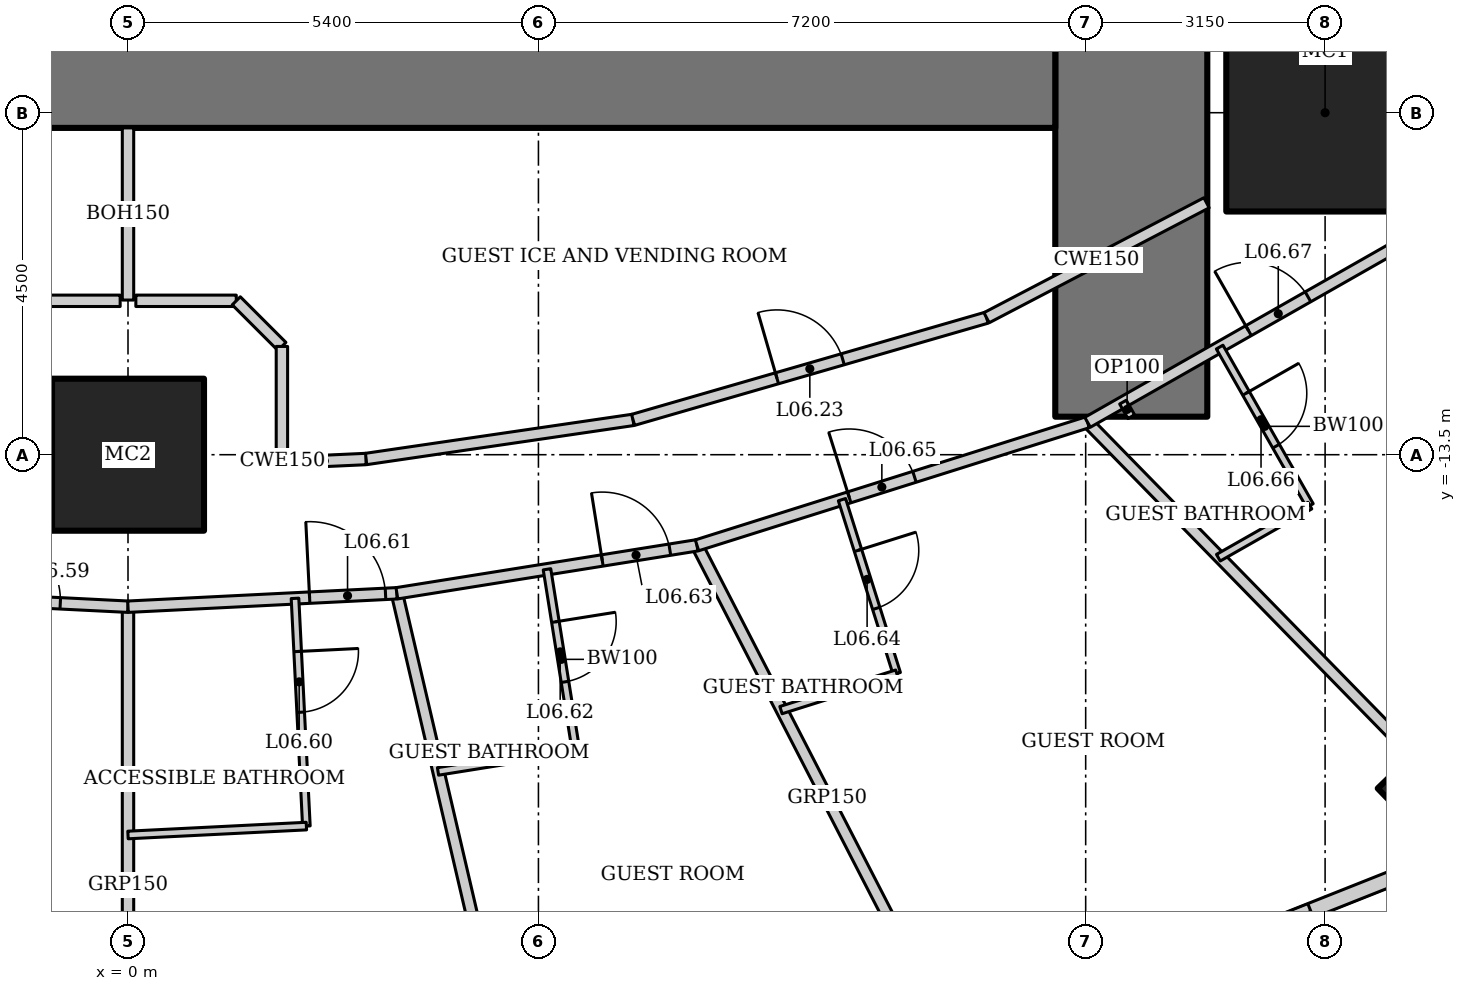
"""IFC4 building model, lengths in metres.
Left out: names, types, materials, properties, quantities, classifications, styles, units other than length and angle.
Written with IfcOpenShell. Run it as: python <this file> out.ifc"""

import sys

from ifc_helpers import new_model, si_unit, direction, frame, frame_2d, origin, origin_2d, place, context, subcontext, project, spatial, rectangle, hollow_rectangle, extrude, element, fill, save


model = new_model("IFC4")
c1 = context("Model", 3, precision=1e-05, world=origin(), true_north=direction((0.0, 1.0)))
c2 = subcontext(c1, "Body", "Model", "MODEL_VIEW")
j1 = project(units=[si_unit("LENGTHUNIT", "METRE"), si_unit("PLANEANGLEUNIT", "RADIAN")], contexts=[c1])
p1 = place(None, origin())
s1 = spatial("IfcSite", under=j1, at=p1, CompositionType="ELEMENT")
p2 = place(p1, origin())
s2 = spatial("IfcBuilding", under=s1, at=p2, CompositionType="ELEMENT")
p3 = place(p2, frame((0.0, 0.0, 37.0)))
s3 = spatial("IfcBuildingStorey", under=s2, at=p3, CompositionType="ELEMENT", Elevation=37.0)
p4 = place(p3, frame((0.0, -13.5, 0.0), z_axis=(0.0, 0.0, 1.0), x_axis=(1.0, 0.0, 0.0)))
e1 = element("IfcColumn", 1, at=p4, inside=s3, PredefinedType="COLUMN", context=c2, shape_type="SweptSolid", body=[
    extrude(hollow_rectangle(XDim=2.0, YDim=2.0, WallThickness=0.17, at=origin_2d()), origin(), (0.0, 0.0, 1.0), 3.6),
])
p5 = place(p3, frame((15.75, -9.0, 0.0), z_axis=(0.0, 0.0, 1.0), x_axis=(1.0, 0.0, 0.0)))
e2 = element("IfcColumn", 2, at=p5, inside=s3, PredefinedType="COLUMN", context=c2, shape_type="SweptSolid", body=[
    extrude(hollow_rectangle(XDim=2.6, YDim=2.6, WallThickness=0.13, at=origin_2d()), origin(), (0.0, 0.0, 1.0), 3.6),
])
p6 = place(p3, frame((17.291, -17.905, 0.0), z_axis=(0.0, 0.0, 1.0), x_axis=(0.719339800339, 0.694658370459, 0.0)))
e3 = element("IfcColumn", 3, at=p6, inside=s3, PredefinedType="COLUMN", context=c2, shape_type="SweptSolid", body=[
    extrude(hollow_rectangle(XDim=1.2, YDim=1.2, WallThickness=0.1, at=origin_2d()), origin(), (0.0, 0.0, 1.0), 3.6),
])
p7 = place(p3, frame((13.2, -13.0, 0.0), z_axis=(0.0, 0.0, 1.0), x_axis=(0.0, 1.0, 0.0)))
e4 = element("IfcWall", 4, at=p7, inside=s3, PredefinedType="SHEAR", context=c2, shape_type="SweptSolid", body=[
    extrude(rectangle(XDim=26.0, YDim=2.0, at=frame_2d((13.0, 0.0))), origin(), (0.0, 0.0, 1.0), 3.6),
])
p8 = place(p7, frame((12.1, 0.0, 0.0)))
e5 = element("IfcOpeningElement", 5, at=p8, cuts=e4, PredefinedType="OPENING", context=c2, shape_type="SweptSolid", body=[
    extrude(rectangle(XDim=1.8, YDim=2.1, at=frame_2d((0.9, 1.05))), frame((0.0, 1.01, 0.0), z_axis=(0.0, -1.0, 0.0), x_axis=(1.0, 0.0, 0.0)), (0.0, 0.0, 1.0), 2.02),
])
p9 = place(p3, frame((-12.2, -8.0, 0.0), z_axis=(0.0, 0.0, 1.0), x_axis=(1.0, 0.0, 0.0)))
e6 = element("IfcWall", 6, at=p9, inside=s3, PredefinedType="SHEAR", context=c2, shape_type="SweptSolid", body=[
    extrude(rectangle(XDim=24.4, YDim=2.4, at=frame_2d((12.2, 0.0))), origin(), (0.0, 0.0, 1.0), 3.6),
])
p10 = place(p3, frame((10.869, -21.363, 0.0), z_axis=(0.0, 0.0, 1.0), x_axis=(0.929358351251, 0.369178892895, 0.0)))
e7 = element("IfcWall", 7, at=p10, inside=s3, PredefinedType="SOLIDWALL", context=c2, shape_type="SweptSolid", body=[
    extrude(rectangle(XDim=7.692, YDim=0.2, at=frame_2d((3.846, 0.0))), origin(), (0.0, 0.0, 1.0), 3.45),
])
p11 = place(p10, frame((2.646, 0.0, 0.5)))
e8 = element("IfcOpeningElement", 8, at=p11, cuts=e7, PredefinedType="OPENING", context=c2, shape_type="SweptSolid", body=[
    extrude(rectangle(XDim=2.4, YDim=2.2, at=frame_2d((1.2, 1.1))), frame((0.0, 0.11, 0.0), z_axis=(0.0, -1.0, 0.0), x_axis=(1.0, 0.0, 0.0)), (0.0, 0.0, 1.0), 0.22),
])
p12 = place(p3, frame((0.0, -22.825, 0.0), z_axis=(0.0, 0.0, 1.0), x_axis=(0.0, 1.0, 0.0)))
e9 = element("IfcWall", 9, at=p12, inside=s3, PredefinedType="PARTITIONING", context=c2, shape_type="SweptSolid", body=[
    extrude(rectangle(XDim=7.325, YDim=0.15, at=frame_2d((3.662, 0.0))), origin(), (0.0, 0.0, 1.0), 2.924),
])
p13 = place(p3, frame((5.211, -22.496, 0.0), z_axis=(0.0, 0.0, 1.0), x_axis=(-0.227195035564, 0.973849277771, 0.0)))
e10 = element("IfcWall", 10, at=p13, inside=s3, PredefinedType="PARTITIONING", context=c2, shape_type="SweptSolid", body=[
    extrude(rectangle(XDim=7.365, YDim=0.15, at=frame_2d((3.683, 0.0))), origin(), (0.0, 0.0, 1.0), 2.767),
])
p14 = place(p3, frame((10.912, -21.346, 0.0), z_axis=(0.0, 0.0, 1.0), x_axis=(-0.45777845119, 0.889066302154, 0.0)))
e11 = element("IfcWall", 11, at=p14, inside=s3, PredefinedType="PARTITIONING", context=c2, shape_type="SweptSolid", body=[
    extrude(rectangle(XDim=7.483, YDim=0.15, at=frame_2d((3.742, 0.0))), origin(), (0.0, 0.0, 1.0), 2.528),
])
p15 = place(p3, frame((17.97, -18.542, 0.0), z_axis=(0.0, 0.0, 1.0), x_axis=(-0.699032031211, 0.715090357467, 0.0)))
e12 = element("IfcWall", 12, at=p15, inside=s3, PredefinedType="PARTITIONING", context=c2, shape_type="SweptSolid", body=[
    extrude(rectangle(XDim=7.647, YDim=0.15, at=frame_2d((3.824, 0.0))), origin(), (0.0, 0.0, 1.0), 2.528),
])
p16 = place(p3, frame((-3.538, -15.323, 0.0), z_axis=(0.0, 0.0, 1.0), x_axis=(0.998754057167, -0.049903239295, 0.0)))
e13 = element("IfcWall", 13, at=p16, inside=s3, PredefinedType="PARTITIONING", context=c2, shape_type="SweptSolid", body=[
    extrude(rectangle(XDim=3.542, YDim=0.15, at=frame_2d((1.771, 0.0))), origin(), (0.0, 0.0, 1.0), 3.45),
])
p17 = place(p16, frame((1.75, 0.0, 0.0)))
e14 = element("IfcOpeningElement", 14, at=p17, cuts=e13, PredefinedType="OPENING", context=c2, shape_type="SweptSolid", body=[
    extrude(rectangle(XDim=0.9, YDim=2.1, at=frame_2d((0.45, 1.05))), frame((0.0, 0.085, 0.0), z_axis=(0.0, -1.0, 0.0), x_axis=(1.0, 0.0, 0.0)), (0.0, 0.0, 1.0), 0.17),
])
p18 = place(p3, frame((0.0, -15.5, 0.0), z_axis=(0.0, 0.0, 1.0), x_axis=(0.998754057167, 0.049903239295, 0.0)))
e15 = element("IfcWall", 15, at=p18, inside=s3, PredefinedType="PARTITIONING", context=c2, shape_type="SweptSolid", body=[
    extrude(rectangle(XDim=3.542, YDim=0.15, at=frame_2d((1.771, 0.0))), origin(), (0.0, 0.0, 1.0), 3.45),
])
p19 = place(p18, frame((2.392, 0.0, 0.0)))
e16 = element("IfcOpeningElement", 16, at=p19, cuts=e15, PredefinedType="OPENING", context=c2, shape_type="SweptSolid", body=[
    extrude(rectangle(XDim=1.0, YDim=2.1, at=frame_2d((0.5, 1.05))), frame((0.0, 0.085, 0.0), z_axis=(0.0, -1.0, 0.0), x_axis=(1.0, 0.0, 0.0)), (0.0, 0.0, 1.0), 0.17),
])
p20 = place(p3, frame((3.538, -15.323, 0.0), z_axis=(0.0, 0.0, 1.0), x_axis=(0.987475660646, 0.157771415761, 0.0)))
e17 = element("IfcWall", 17, at=p20, inside=s3, PredefinedType="PARTITIONING", context=c2, shape_type="SweptSolid", body=[
    extrude(rectangle(XDim=3.999, YDim=0.15, at=frame_2d((1.999, 0.0))), origin(), (0.0, 0.0, 1.0), 3.45),
])
p21 = place(p20, frame((2.736, 0.0, 0.0)))
e18 = element("IfcOpeningElement", 18, at=p21, cuts=e17, PredefinedType="OPENING", context=c2, shape_type="SweptSolid", body=[
    extrude(rectangle(XDim=0.9, YDim=2.1, at=frame_2d((0.45, 1.05))), frame((0.0, 0.085, 0.0), z_axis=(0.0, -1.0, 0.0), x_axis=(1.0, 0.0, 0.0)), (0.0, 0.0, 1.0), 0.17),
])
p22 = place(p3, frame((7.486, -14.692, 0.0), z_axis=(0.0, 0.0, 1.0), x_axis=(0.953774229808, 0.30052407317, 0.0)))
e19 = element("IfcWall", 19, at=p22, inside=s3, PredefinedType="PARTITIONING", context=c2, shape_type="SweptSolid", body=[
    extrude(rectangle(XDim=5.388, YDim=0.15, at=frame_2d((2.694, 0.0))), origin(), (0.0, 0.0, 1.0), 3.45),
])
p23 = place(p22, frame((2.1, 0.0, 0.0)))
e20 = element("IfcOpeningElement", 20, at=p23, cuts=e19, PredefinedType="OPENING", context=c2, shape_type="SweptSolid", body=[
    extrude(rectangle(XDim=0.9, YDim=2.1, at=frame_2d((0.45, 1.05))), frame((0.0, 0.085, 0.0), z_axis=(0.0, -1.0, 0.0), x_axis=(1.0, 0.0, 0.0)), (0.0, 0.0, 1.0), 0.17),
])
p24 = place(p3, frame((12.625, -13.073, 0.0), z_axis=(0.0, 0.0, 1.0), x_axis=(0.86907565943, 0.494679187136, 0.0)))
e21 = element("IfcWall", 21, at=p24, inside=s3, PredefinedType="PARTITIONING", context=c2, shape_type="SweptSolid", body=[
    extrude(rectangle(XDim=5.911, YDim=0.15, at=frame_2d((2.955, 0.0))), origin(), (0.0, 0.0, 1.0), 3.45),
])
p25 = place(p24, frame((2.437, 0.0, 0.0)))
e22 = element("IfcOpeningElement", 22, at=p25, cuts=e21, PredefinedType="OPENING", context=c2, shape_type="SweptSolid", body=[
    extrude(rectangle(XDim=0.9, YDim=2.1, at=frame_2d((0.45, 1.05))), frame((0.0, 0.085, 0.0), z_axis=(0.0, -1.0, 0.0), x_axis=(1.0, 0.0, 0.0)), (0.0, 0.0, 1.0), 0.17),
])
p26 = place(p3, frame((3.13, -13.557, 0.0), z_axis=(0.0, 0.0, 1.0), x_axis=(0.989443047021, 0.14492224364, 0.0)))
e23 = element("IfcWall", 23, at=p26, inside=s3, PredefinedType="PARTITIONING", context=c2, shape_type="SweptSolid", body=[
    extrude(rectangle(XDim=3.553, YDim=0.15, at=frame_2d((1.776, 0.0))), origin(), (0.0, 0.0, 1.0), 3.45),
])
p27 = place(p3, frame((6.645, -13.042, 0.0), z_axis=(0.0, 0.0, 1.0), x_axis=(0.960678318068, 0.277663770041, 0.0)))
e24 = element("IfcWall", 24, at=p27, inside=s3, PredefinedType="PARTITIONING", context=c2, shape_type="SweptSolid", body=[
    extrude(rectangle(XDim=4.841, YDim=0.15, at=frame_2d((2.421, 0.0))), origin(), (0.0, 0.0, 1.0), 3.45),
])
p28 = place(p27, frame((1.971, 0.0, 0.0)))
e25 = element("IfcOpeningElement", 25, at=p28, cuts=e24, PredefinedType="OPENING", context=c2, shape_type="SweptSolid", body=[
    extrude(rectangle(XDim=0.9, YDim=2.1, at=frame_2d((0.45, 1.05))), frame((0.0, 0.085, 0.0), z_axis=(0.0, -1.0, 0.0), x_axis=(1.0, 0.0, 0.0)), (0.0, 0.0, 1.0), 0.17),
])
p29 = place(p3, frame((2.197, -15.39, 0.0), z_axis=(0.0, 0.0, 1.0), x_axis=(0.049888907753, -0.998754773147, 0.0)))
e26 = element("IfcWall", 26, at=p29, inside=s3, PredefinedType="PARTITIONING", context=c2, shape_type="SweptSolid", body=[
    extrude(rectangle(XDim=3.0, YDim=0.1, at=frame_2d((1.5, 0.0))), origin(), (0.0, 0.0, 1.0), 3.45),
])
p30 = place(p29, frame((0.7, 0.0, 0.0)))
e27 = element("IfcOpeningElement", 27, at=p30, cuts=e26, PredefinedType="OPENING", context=c2, shape_type="SweptSolid", body=[
    extrude(rectangle(XDim=0.8, YDim=2.1, at=frame_2d((0.4, 1.05))), frame((0.0, 0.06, 0.0), z_axis=(0.0, -1.0, 0.0), x_axis=(1.0, 0.0, 0.0)), (0.0, 0.0, 1.0), 0.12),
])
p31 = place(p3, frame((2.347, -18.386, 0.0), z_axis=(0.0, 0.0, 1.0), x_axis=(-0.998755704817, -0.049870252607, 0.0)))
e28 = element("IfcWall", 28, at=p31, inside=s3, PredefinedType="PARTITIONING", context=c2, shape_type="SweptSolid", body=[
    extrude(rectangle(XDim=2.35, YDim=0.1, at=frame_2d((1.175, 0.0))), origin(), (0.0, 0.0, 1.0), 3.45),
])
p32 = place(p3, frame((5.513, -15.008, 0.0), z_axis=(0.0, 0.0, 1.0), x_axis=(0.157780217218, -0.987474254376, 0.0)))
e29 = element("IfcWall", 29, at=p32, inside=s3, PredefinedType="PARTITIONING", context=c2, shape_type="SweptSolid", body=[
    extrude(rectangle(XDim=2.4, YDim=0.1, at=frame_2d((1.2, 0.0))), origin(), (0.0, 0.0, 1.0), 3.45),
])
p33 = place(p32, frame((0.7, 0.0, 0.0)))
e30 = element("IfcOpeningElement", 30, at=p33, cuts=e29, PredefinedType="OPENING", context=c2, shape_type="SweptSolid", body=[
    extrude(rectangle(XDim=0.8, YDim=2.1, at=frame_2d((0.4, 1.05))), frame((0.0, 0.06, 0.0), z_axis=(0.0, -1.0, 0.0), x_axis=(1.0, 0.0, 0.0)), (0.0, 0.0, 1.0), 0.12),
])
p34 = place(p3, frame((5.891, -17.378, 0.0), z_axis=(0.0, 0.0, 1.0), x_axis=(-0.987478784284, -0.157751863976, 0.0)))
e31 = element("IfcWall", 31, at=p34, inside=s3, PredefinedType="PARTITIONING", context=c2, shape_type="SweptSolid", body=[
    extrude(rectangle(XDim=1.835, YDim=0.1, at=frame_2d((0.918, 0.0))), origin(), (0.0, 0.0, 1.0), 3.45),
])
p35 = place(p3, frame((9.394, -14.091, 0.0), z_axis=(0.0, 0.0, 1.0), x_axis=(0.30049839721, -0.953782319649, 0.0)))
e32 = element("IfcWall", 32, at=p35, inside=s3, PredefinedType="PARTITIONING", context=c2, shape_type="SweptSolid", body=[
    extrude(rectangle(XDim=2.4, YDim=0.1, at=frame_2d((1.2, 0.0))), origin(), (0.0, 0.0, 1.0), 3.45),
])
p36 = place(p35, frame((0.7, 0.0, 0.0)))
e33 = element("IfcOpeningElement", 33, at=p36, cuts=e32, PredefinedType="OPENING", context=c2, shape_type="SweptSolid", body=[
    extrude(rectangle(XDim=0.8, YDim=2.1, at=frame_2d((0.4, 1.05))), frame((0.0, 0.06, 0.0), z_axis=(0.0, -1.0, 0.0), x_axis=(1.0, 0.0, 0.0)), (0.0, 0.0, 1.0), 0.12),
])
p37 = place(p3, frame((10.115, -16.38, 0.0), z_axis=(0.0, 0.0, 1.0), x_axis=(-0.953764923986, -0.300553605492, 0.0)))
e34 = element("IfcWall", 34, at=p37, inside=s3, PredefinedType="PARTITIONING", context=c2, shape_type="SweptSolid", body=[
    extrude(rectangle(XDim=1.598, YDim=0.1, at=frame_2d((0.799, 0.0))), origin(), (0.0, 0.0, 1.0), 3.45),
])
p38 = place(p3, frame((14.363, -12.084, 0.0), z_axis=(0.0, 0.0, 1.0), x_axis=(0.494703113698, -0.869062039959, 0.0)))
e35 = element("IfcWall", 35, at=p38, inside=s3, PredefinedType="PARTITIONING", context=c2, shape_type="SweptSolid", body=[
    extrude(rectangle(XDim=2.4, YDim=0.1, at=frame_2d((1.2, 0.0))), origin(), (0.0, 0.0, 1.0), 3.45),
])
p39 = place(p38, frame((0.7, 0.0, 0.0)))
e36 = element("IfcOpeningElement", 36, at=p39, cuts=e35, PredefinedType="OPENING", context=c2, shape_type="SweptSolid", body=[
    extrude(rectangle(XDim=0.8, YDim=2.1, at=frame_2d((0.4, 1.05))), frame((0.0, 0.06, 0.0), z_axis=(0.0, -1.0, 0.0), x_axis=(1.0, 0.0, 0.0)), (0.0, 0.0, 1.0), 0.12),
])
p40 = place(p3, frame((15.55, -14.17, 0.0), z_axis=(0.0, 0.0, 1.0), x_axis=(-0.869065896633, -0.494696338485, 0.0)))
e37 = element("IfcWall", 37, at=p40, inside=s3, PredefinedType="PARTITIONING", context=c2, shape_type="SweptSolid", body=[
    extrude(rectangle(XDim=1.386, YDim=0.1, at=frame_2d((0.693, 0.0))), origin(), (0.0, 0.0, 1.0), 3.45),
])
p41 = place(p3, frame((13.2, -13.0, 0.0), z_axis=(0.0, 0.0, 1.0), x_axis=(-0.49435138335, 0.869262164011, 0.0)))
e38 = element("IfcWall", 38, at=p41, inside=s3, PredefinedType="PARTITIONING", context=c2, shape_type="SweptSolid", body=[
    extrude(rectangle(XDim=0.221, YDim=0.1, at=frame_2d((0.11, 0.0))), origin(), (0.0, 0.0, 1.0), 3.45),
])
p42 = place(p3, frame((2.035, -13.607, 0.0), z_axis=(0.0, 0.0, 1.0), x_axis=(0.998946843147, 0.045882508292, 0.0)))
e39 = element("IfcWall", 39, at=p42, inside=s3, PredefinedType="PARTITIONING", context=c2, shape_type="SweptSolid", body=[
    extrude(rectangle(XDim=1.096, YDim=0.15, at=frame_2d((0.548, 0.0))), origin(), (0.0, 0.0, 1.0), 3.45),
])
p43 = place(p3, frame((0.0, -9.2, 0.0), z_axis=(0.0, 0.0, 1.0), x_axis=(0.0, -1.0, 0.0)))
e40 = element("IfcWall", 40, at=p43, inside=s3, PredefinedType="PARTITIONING", context=c2, shape_type="SweptSolid", body=[
    extrude(rectangle(XDim=2.265, YDim=0.15, at=frame_2d((1.133, 0.0))), origin(), (0.0, 0.0, 1.0), 3.044),
])
for number, where, z_axis, x_axis in (
    (41, (-1.425, -11.475, 0.0), (0.0, 0.0, 1.0), (1.0, 0.0, 0.0)),
    (42, (0.103, -11.475, 0.0), (0.0, 0.0, 1.0), (1.0, 0.0, 0.0)),
):
    element("IfcWall", number, at=place(p3, frame(where, z_axis=z_axis, x_axis=x_axis)), inside=s3, PredefinedType="PARTITIONING", context=c2, shape_type="SweptSolid", body=[
        extrude(rectangle(XDim=1.321, YDim=0.15, at=frame_2d((0.661, 0.0))), origin(), (0.0, 0.0, 1.0), 3.45),
    ])
p44 = place(p3, frame((1.425, -11.475, 0.0), z_axis=(0.0, 0.0, 1.0), x_axis=(0.707106781187, -0.707106781187, 0.0)))
e43 = element("IfcWall", 43, at=p44, inside=s3, PredefinedType="PARTITIONING", context=c2, shape_type="SweptSolid", body=[
    extrude(rectangle(XDim=0.849, YDim=0.15, at=frame_2d((0.425, 0.0))), origin(), (0.0, 0.0, 1.0), 3.45),
])
p45 = place(p3, frame((2.025, -12.075, 0.0), z_axis=(0.0, 0.0, 1.0), x_axis=(0.0, -1.0, 0.0)))
e44 = element("IfcWall", 44, at=p45, inside=s3, PredefinedType="PARTITIONING", context=c2, shape_type="SweptSolid", body=[
    extrude(rectangle(XDim=1.427, YDim=0.15, at=frame_2d((0.714, 0.0))), origin(), (0.0, 0.0, 1.0), 2.749),
])
p46 = place(p3, frame((11.296, -11.698, 0.0), z_axis=(0.0, 0.0, 1.0), x_axis=(0.886283344337, 0.463143426544, 0.0)))
e45 = element("IfcWall", 45, at=p46, inside=s3, PredefinedType="PARTITIONING", context=c2, shape_type="SweptSolid", body=[
    extrude(rectangle(XDim=3.265, YDim=0.15, at=frame_2d((1.633, 0.0))), origin(), (0.0, 0.0, 1.0), 3.45),
])
p47 = place(p11, origin())
e46 = element("IfcWindow", 46, at=p47, inside=s3, PartitioningType="SINGLE_PANEL", PredefinedType="WINDOW", context=c2, shape_type="SweptSolid", body=[
    extrude(rectangle(XDim=2.4, YDim=2.2, at=frame_2d((1.2, 1.1))), frame((0.0, 0.03, 0.0), z_axis=(0.0, -1.0, 0.0), x_axis=(1.0, 0.0, 0.0)), (0.0, 0.0, 1.0), 0.06),
])
fill(e8, e46)
p48 = place(p28, origin())
e47 = element("IfcDoor", 47, at=p48, inside=s3, OperationType="SINGLE_SWING_LEFT", PredefinedType="DOOR", context=c2, shape_type="SweptSolid", body=[
    extrude(rectangle(XDim=0.9, YDim=2.1, at=frame_2d((0.45, 1.05))), frame((0.0, 0.025, 0.0), z_axis=(0.0, -1.0, 0.0), x_axis=(1.0, 0.0, 0.0)), (0.0, 0.0, 1.0), 0.05),
])
fill(e25, e47)
p49 = place(p17, origin())
e48 = element("IfcDoor", 48, at=p49, inside=s3, OperationType="SINGLE_SWING_LEFT", PredefinedType="DOOR", context=c2, shape_type="SweptSolid", body=[
    extrude(rectangle(XDim=0.9, YDim=2.1, at=frame_2d((0.45, 1.05))), frame((0.0, 0.025, 0.0), z_axis=(0.0, -1.0, 0.0), x_axis=(1.0, 0.0, 0.0)), (0.0, 0.0, 1.0), 0.05),
])
fill(e14, e48)
p50 = place(p30, origin())
e49 = element("IfcDoor", 49, at=p50, inside=s3, OperationType="SINGLE_SWING_LEFT", PredefinedType="DOOR", context=c2, shape_type="SweptSolid", body=[
    extrude(rectangle(XDim=0.8, YDim=2.1, at=frame_2d((0.4, 1.05))), frame((0.0, 0.025, 0.0), z_axis=(0.0, -1.0, 0.0), x_axis=(1.0, 0.0, 0.0)), (0.0, 0.0, 1.0), 0.05),
])
fill(e27, e49)
p51 = place(p19, origin())
e50 = element("IfcDoor", 50, at=p51, inside=s3, OperationType="SINGLE_SWING_LEFT", PredefinedType="DOOR", context=c2, shape_type="SweptSolid", body=[
    extrude(rectangle(XDim=1.0, YDim=2.1, at=frame_2d((0.5, 1.05))), frame((0.0, 0.025, 0.0), z_axis=(0.0, -1.0, 0.0), x_axis=(1.0, 0.0, 0.0)), (0.0, 0.0, 1.0), 0.05),
])
fill(e16, e50)
p52 = place(p33, origin())
e51 = element("IfcDoor", 51, at=p52, inside=s3, OperationType="SINGLE_SWING_LEFT", PredefinedType="DOOR", context=c2, shape_type="SweptSolid", body=[
    extrude(rectangle(XDim=0.8, YDim=2.1, at=frame_2d((0.4, 1.05))), frame((0.0, 0.025, 0.0), z_axis=(0.0, -1.0, 0.0), x_axis=(1.0, 0.0, 0.0)), (0.0, 0.0, 1.0), 0.05),
])
fill(e30, e51)
p53 = place(p21, origin())
e52 = element("IfcDoor", 52, at=p53, inside=s3, OperationType="SINGLE_SWING_LEFT", PredefinedType="DOOR", context=c2, shape_type="SweptSolid", body=[
    extrude(rectangle(XDim=0.9, YDim=2.1, at=frame_2d((0.45, 1.05))), frame((0.0, 0.025, 0.0), z_axis=(0.0, -1.0, 0.0), x_axis=(1.0, 0.0, 0.0)), (0.0, 0.0, 1.0), 0.05),
])
fill(e18, e52)
p54 = place(p36, origin())
e53 = element("IfcDoor", 53, at=p54, inside=s3, OperationType="SINGLE_SWING_LEFT", PredefinedType="DOOR", context=c2, shape_type="SweptSolid", body=[
    extrude(rectangle(XDim=0.8, YDim=2.1, at=frame_2d((0.4, 1.05))), frame((0.0, 0.025, 0.0), z_axis=(0.0, -1.0, 0.0), x_axis=(1.0, 0.0, 0.0)), (0.0, 0.0, 1.0), 0.05),
])
fill(e33, e53)
p55 = place(p23, origin())
e54 = element("IfcDoor", 54, at=p55, inside=s3, OperationType="SINGLE_SWING_LEFT", PredefinedType="DOOR", context=c2, shape_type="SweptSolid", body=[
    extrude(rectangle(XDim=0.9, YDim=2.1, at=frame_2d((0.45, 1.05))), frame((0.0, 0.025, 0.0), z_axis=(0.0, -1.0, 0.0), x_axis=(1.0, 0.0, 0.0)), (0.0, 0.0, 1.0), 0.05),
])
fill(e20, e54)
p56 = place(p39, origin())
e55 = element("IfcDoor", 55, at=p56, inside=s3, OperationType="SINGLE_SWING_LEFT", PredefinedType="DOOR", context=c2, shape_type="SweptSolid", body=[
    extrude(rectangle(XDim=0.8, YDim=2.1, at=frame_2d((0.4, 1.05))), frame((0.0, 0.025, 0.0), z_axis=(0.0, -1.0, 0.0), x_axis=(1.0, 0.0, 0.0)), (0.0, 0.0, 1.0), 0.05),
])
fill(e36, e55)
p57 = place(p25, origin())
e56 = element("IfcDoor", 56, at=p57, inside=s3, OperationType="SINGLE_SWING_LEFT", PredefinedType="DOOR", context=c2, shape_type="SweptSolid", body=[
    extrude(rectangle(XDim=0.9, YDim=2.1, at=frame_2d((0.45, 1.05))), frame((0.0, 0.025, 0.0), z_axis=(0.0, -1.0, 0.0), x_axis=(1.0, 0.0, 0.0)), (0.0, 0.0, 1.0), 0.05),
])
fill(e22, e56)
save(model, sys.argv[1])
